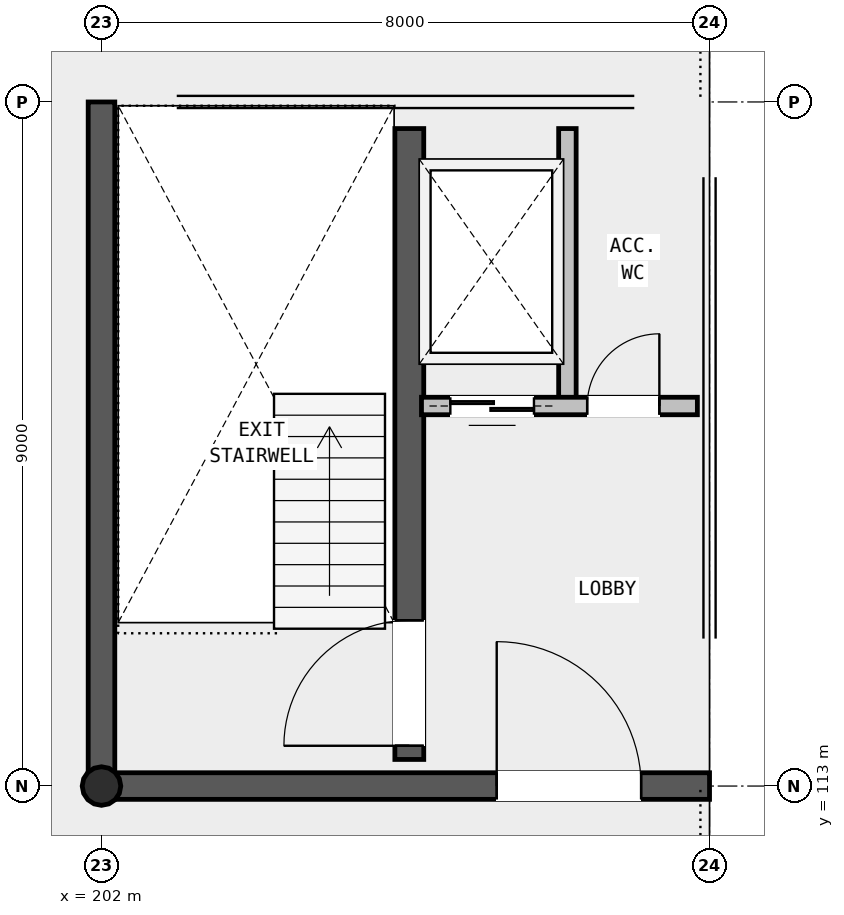
"""IFC4 building model, lengths in metres.
Left out: names, types, materials, properties, quantities, classifications, styles, units other than length and angle.
Written with IfcOpenShell. Run it as: python <this file> out.ifc"""

import sys

from ifc_helpers import new_model, si_unit, direction, frame, frame_2d, origin, origin_2d, place, context, subcontext, project, spatial, rectangle, hollow_circle, extrude, element, fill, save


model = new_model("IFC4")
c1 = context("Model", 3, precision=1e-05, world=origin(), true_north=direction((0.0, 1.0)))
c2 = subcontext(c1, "Body", "Model", "MODEL_VIEW")
j1 = project(units=[si_unit("LENGTHUNIT", "METRE"), si_unit("PLANEANGLEUNIT", "RADIAN")], contexts=[c1])
p1 = place(None, origin())
s1 = spatial("IfcSite", under=j1, at=p1, CompositionType="ELEMENT")
p2 = place(p1, origin())
s2 = spatial("IfcBuilding", under=s1, at=p2, CompositionType="ELEMENT")
p3 = place(p2, frame((0.0, 0.0, 21.2)))
s3 = spatial("IfcBuildingStorey", under=s2, at=p3, CompositionType="ELEMENT", Elevation=21.2)
p4 = place(p3, frame((202.0, 113.0, 0.0), z_axis=(0.0, 0.0, 1.0), x_axis=(1.0, 0.0, 0.0)))
e1 = element("IfcColumn", 1, at=p4, inside=s3, PredefinedType="COLUMN", context=c2, shape_type="SweptSolid", body=[
    extrude(hollow_circle(Radius=0.254, WallThickness=0.016, at=origin_2d()), origin(), (0.0, 0.0, 1.0), 3.68),
])
p5 = place(p3, frame((202.0, 113.0, 0.0), z_axis=(0.0, 0.0, 1.0), x_axis=(1.0, 0.0, 0.0)))
e2 = element("IfcWall", 2, at=p5, inside=s3, PredefinedType="SHEAR", context=c2, shape_type="SweptSolid", body=[
    extrude(rectangle(XDim=8.0, YDim=0.35, at=frame_2d((4.0, 0.0))), origin(), (0.0, 0.0, 1.0), 2.4),
])
p6 = place(p5, frame((5.2, 0.0, 0.0)))
e3 = element("IfcOpeningElement", 3, at=p6, cuts=e2, PredefinedType="OPENING", context=c2, shape_type="SweptSolid", body=[
    extrude(rectangle(XDim=1.9, YDim=2.3, at=frame_2d((0.95, 1.15))), frame((0.0, 0.185, 0.0), z_axis=(0.0, -1.0, 0.0), x_axis=(1.0, 0.0, 0.0)), (0.0, 0.0, 1.0), 0.37),
])
p7 = place(p3, frame((202.0, 122.0, 0.0), z_axis=(0.0, 0.0, 1.0), x_axis=(0.0, -1.0, 0.0)))
e4 = element("IfcWall", 4, at=p7, inside=s3, PredefinedType="SHEAR", context=c2, shape_type="SweptSolid", body=[
    extrude(rectangle(XDim=9.0, YDim=0.35, at=frame_2d((4.5, 0.0))), origin(), (0.0, 0.0, 1.0), 2.4),
])
p8 = place(p3, frame((206.05, 113.35, 0.0), z_axis=(0.0, 0.0, 1.0), x_axis=(0.0, 1.0, 0.0)))
e5 = element("IfcWall", 5, at=p8, inside=s3, PredefinedType="SHEAR", context=c2, shape_type="SweptSolid", body=[
    extrude(rectangle(XDim=8.3, YDim=0.38, at=frame_2d((4.15, 0.0))), origin(), (0.0, 0.0, 1.0), 2.4),
])
p9 = place(p8, frame((0.18, 0.0, 0.0)))
e6 = element("IfcOpeningElement", 6, at=p9, cuts=e5, PredefinedType="OPENING", context=c2, shape_type="SweptSolid", body=[
    extrude(rectangle(XDim=1.65, YDim=2.2, at=frame_2d((0.825, 1.1))), frame((0.0, 0.2, 0.0), z_axis=(0.0, -1.0, 0.0), x_axis=(1.0, 0.0, 0.0)), (0.0, 0.0, 1.0), 0.4),
])
p10 = place(p3, frame((208.13, 118.0, 0.0), z_axis=(0.0, 0.0, 1.0), x_axis=(0.0, 1.0, 0.0)))
e7 = element("IfcWall", 7, at=p10, inside=s3, PredefinedType="PARTITIONING", context=c2, shape_type="SweptSolid", body=[
    extrude(rectangle(XDim=3.65, YDim=0.23, at=frame_2d((1.825, 0.0))), origin(), (0.0, 0.0, 1.0), 2.4),
])
p11 = place(p3, frame((206.21, 118.0, 0.0), z_axis=(0.0, 0.0, 1.0), x_axis=(1.0, 0.0, 0.0)))
e8 = element("IfcWall", 8, at=p11, inside=s3, PredefinedType="PARTITIONING", context=c2, shape_type="SweptSolid", body=[
    extrude(rectangle(XDim=3.63, YDim=0.23, at=frame_2d((1.815, 0.0))), origin(), (0.0, 0.0, 1.0), 2.4),
])
p12 = place(p11, frame((0.38, 0.0, 0.0)))
e9 = element("IfcOpeningElement", 9, at=p12, cuts=e8, PredefinedType="OPENING", context=c2, shape_type="SweptSolid", body=[
    extrude(rectangle(XDim=1.1, YDim=2.15, at=frame_2d((0.55, 1.075))), frame((0.0, 0.125, 0.0), z_axis=(0.0, -1.0, 0.0), x_axis=(1.0, 0.0, 0.0)), (0.0, 0.0, 1.0), 0.25),
])
p13 = place(p11, frame((2.18, 0.0, 0.0)))
e10 = element("IfcOpeningElement", 10, at=p13, cuts=e8, PredefinedType="OPENING", context=c2, shape_type="SweptSolid", body=[
    extrude(rectangle(XDim=0.95, YDim=2.1, at=frame_2d((0.475, 1.05))), frame((0.0, 0.125, 0.0), z_axis=(0.0, -1.0, 0.0), x_axis=(1.0, 0.0, 0.0)), (0.0, 0.0, 1.0), 0.25),
])
p14 = place(p6, origin())
e11 = element("IfcDoor", 11, at=p14, inside=s3, OperationType="SINGLE_SWING_LEFT", PredefinedType="DOOR", context=c2, shape_type="SweptSolid", body=[
    extrude(rectangle(XDim=1.9, YDim=2.3, at=frame_2d((0.95, 1.15))), frame((0.0, 0.025, 0.0), z_axis=(0.0, -1.0, 0.0), x_axis=(1.0, 0.0, 0.0)), (0.0, 0.0, 1.0), 0.05),
])
fill(e3, e11)
p15 = place(p9, origin())
e12 = element("IfcDoor", 12, at=p15, inside=s3, OperationType="SINGLE_SWING_LEFT", PredefinedType="DOOR", context=c2, shape_type="SweptSolid", body=[
    extrude(rectangle(XDim=1.65, YDim=2.2, at=frame_2d((0.825, 1.1))), frame((0.0, 0.025, 0.0), z_axis=(0.0, -1.0, 0.0), x_axis=(1.0, 0.0, 0.0)), (0.0, 0.0, 1.0), 0.05),
])
fill(e6, e12)
p16 = place(p12, origin())
e13 = element("IfcDoor", 13, at=p16, inside=s3, OperationType="SLIDING_TO_LEFT", PredefinedType="DOOR", context=c2, shape_type="SweptSolid", body=[
    extrude(rectangle(XDim=1.1, YDim=2.15, at=frame_2d((0.55, 1.075))), frame((0.0, 0.025, 0.0), z_axis=(0.0, -1.0, 0.0), x_axis=(1.0, 0.0, 0.0)), (0.0, 0.0, 1.0), 0.05),
])
fill(e9, e13)
p17 = place(p13, origin())
e14 = element("IfcDoor", 14, at=p17, inside=s3, OperationType="SINGLE_SWING_RIGHT", PredefinedType="DOOR", context=c2, shape_type="SweptSolid", body=[
    extrude(rectangle(XDim=0.95, YDim=2.1, at=frame_2d((0.475, 1.05))), frame((0.0, 0.025, 0.0), z_axis=(0.0, -1.0, 0.0), x_axis=(1.0, 0.0, 0.0)), (0.0, 0.0, 1.0), 0.05),
])
fill(e10, e14)
save(model, sys.argv[1])
